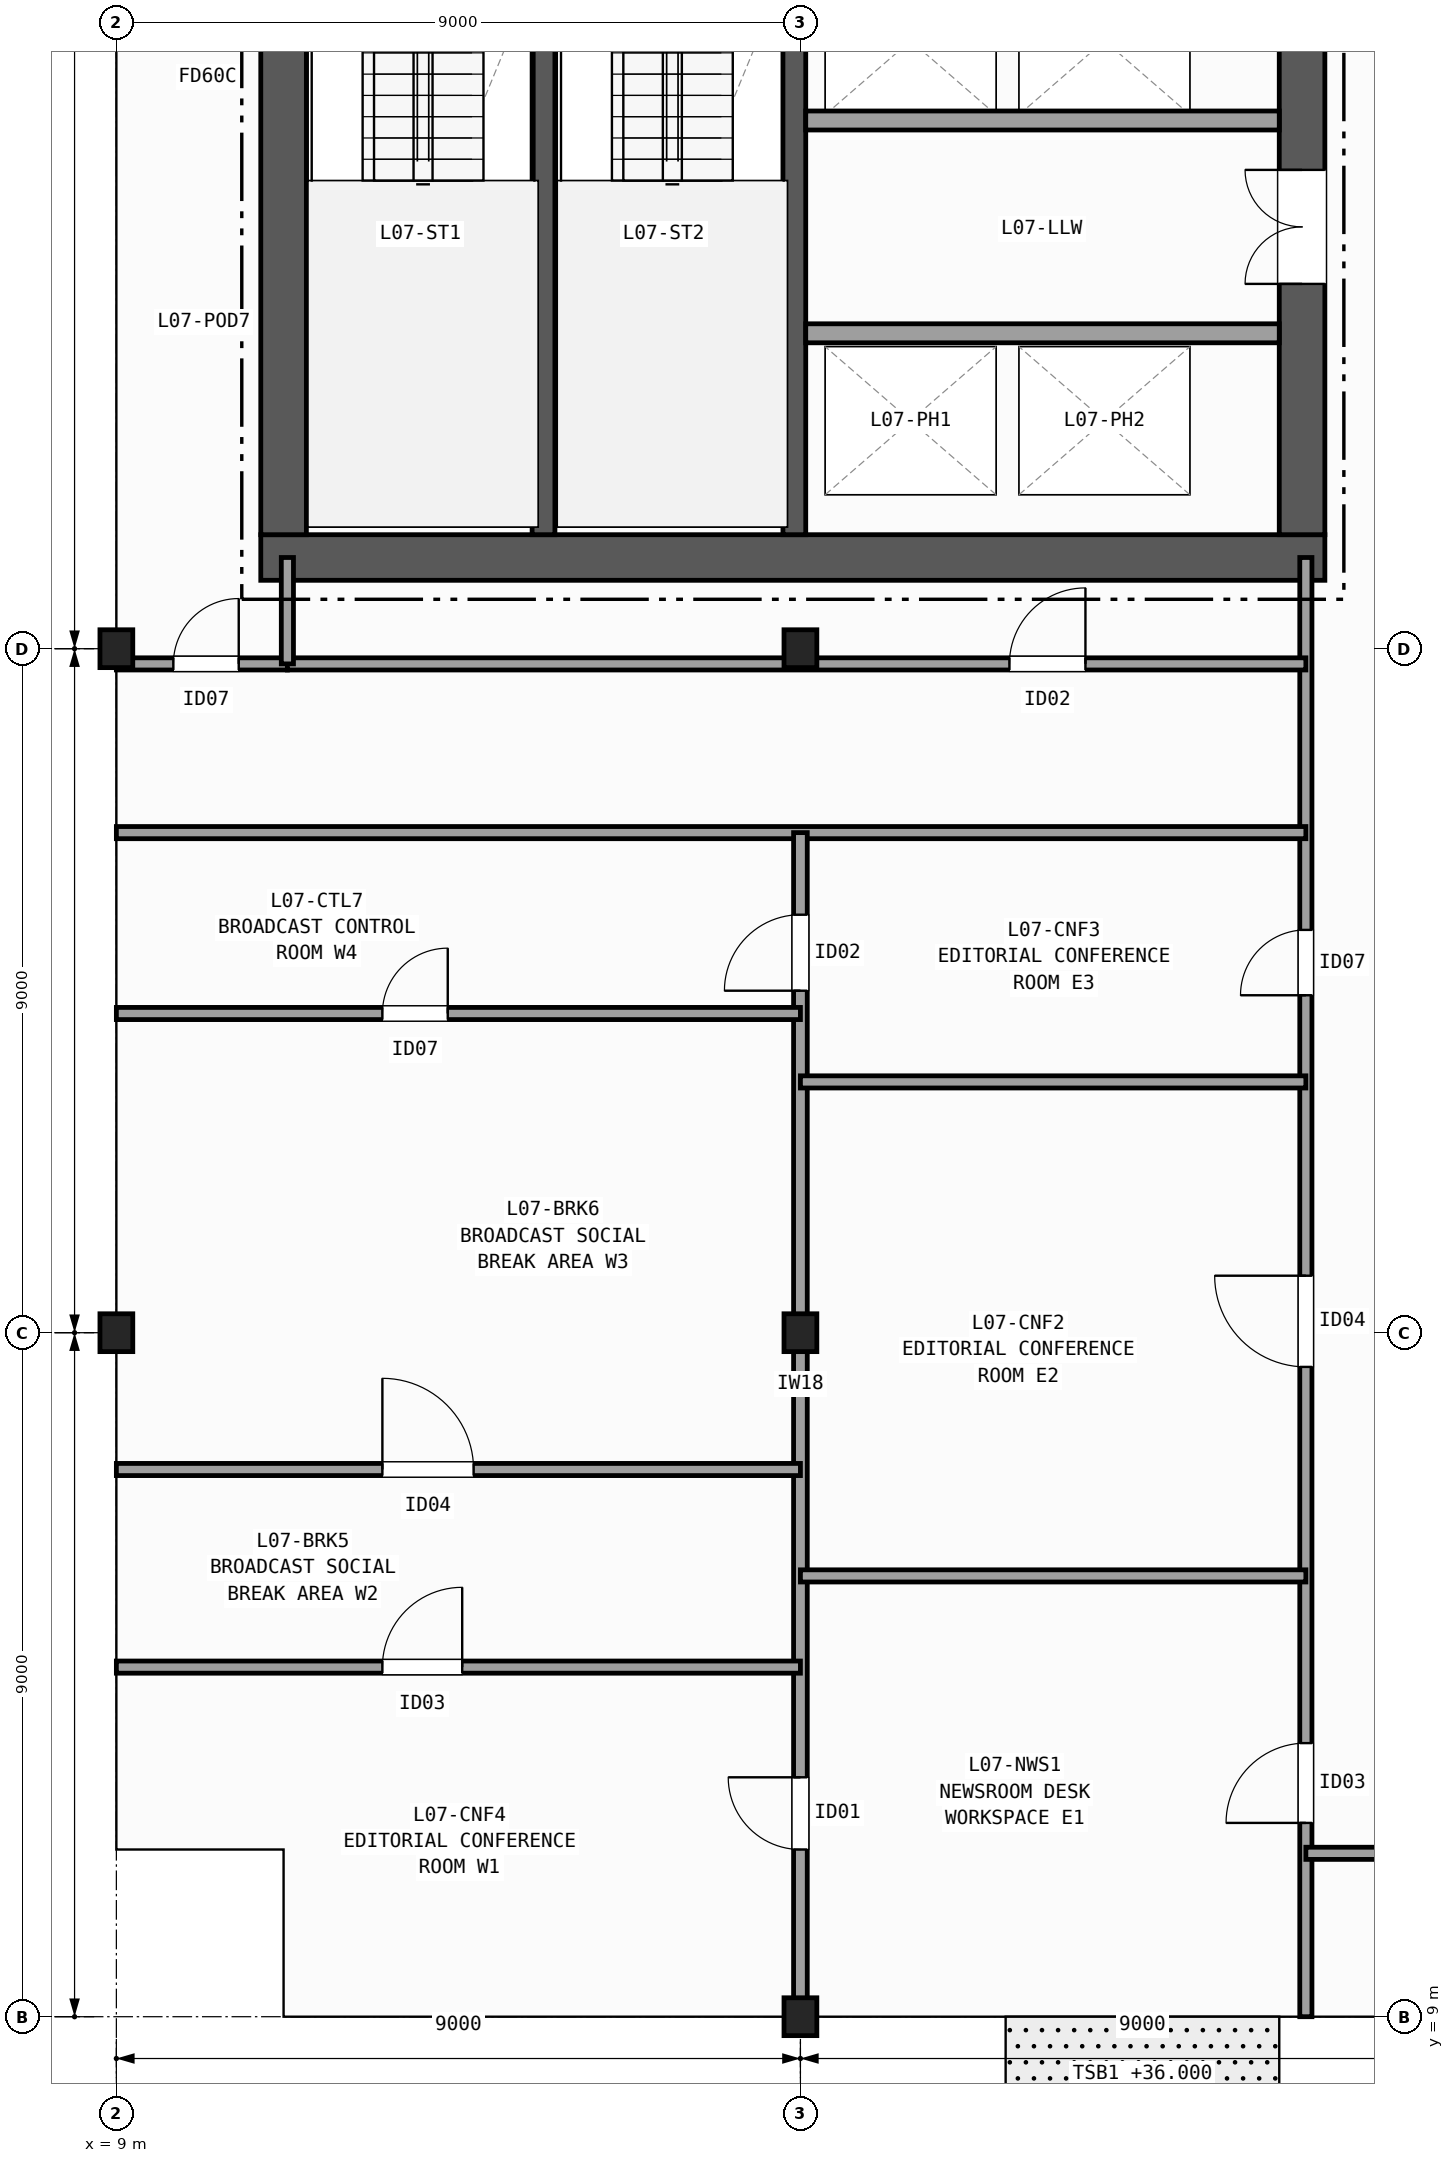
"""IFC4 building model, lengths in metres.
Left out: names, types, materials, properties, quantities, classifications, styles, units other than length and angle.
Written with IfcOpenShell. Run it as: python <this file> out.ifc"""

import sys

from ifc_helpers import new_model, si_unit, direction, frame, frame_2d, origin, origin_2d, place, context, subcontext, project, spatial, rectangle, i_section, extrude, element, fill, save


model = new_model("IFC4")
c1 = context("Model", 3, precision=1e-05, world=origin(), true_north=direction((0.0, 1.0)))
c2 = subcontext(c1, "Body", "Model", "MODEL_VIEW")
j1 = project(units=[si_unit("LENGTHUNIT", "METRE"), si_unit("PLANEANGLEUNIT", "RADIAN")], contexts=[c1])
p1 = place(None, origin())
s1 = spatial("IfcSite", under=j1, at=p1, CompositionType="ELEMENT")
p2 = place(p1, origin())
s2 = spatial("IfcBuilding", under=s1, at=p2, CompositionType="ELEMENT")
p3 = place(p2, frame((0.0, 0.0, 36.0)))
s3 = spatial("IfcBuildingStorey", under=s2, at=p3, CompositionType="ELEMENT", Elevation=36.0)
for number, where, z_axis, x_axis in (
    (1, (9.0, 18.0, 0.0), (0.0, 0.0, 1.0), (1.0, 0.0, 0.0)),
    (2, (9.0, 27.0, 0.0), (0.0, 0.0, 1.0), (1.0, 0.0, 0.0)),
    (3, (18.0, 9.0, 0.0), (0.0, 0.0, 1.0), (1.0, 0.0, 0.0)),
    (4, (18.0, 18.0, 0.0), (0.0, 0.0, 1.0), (1.0, 0.0, 0.0)),
    (5, (18.0, 27.0, 0.0), (0.0, 0.0, 1.0), (1.0, 0.0, 0.0)),
):
    element("IfcColumn", number, at=place(p3, frame(where, z_axis=z_axis, x_axis=x_axis)), inside=s3, PredefinedType="COLUMN", context=c2, shape_type="SweptSolid", body=[
        extrude(i_section(OverallWidth=0.432, OverallDepth=0.498, WebThickness=0.056, FlangeThickness=0.089, FilletRadius=0.015, at=origin_2d()), origin(), (0.0, 0.0, 1.0), 3.7),
    ])
p4 = place(p3, frame((10.9, 28.2, 0.0), z_axis=(0.0, 0.0, 1.0), x_axis=(1.0, 0.0, 0.0)))
e6 = element("IfcWall", 6, at=p4, inside=s3, PredefinedType="SHEAR", context=c2, shape_type="SweptSolid", body=[
    extrude(rectangle(XDim=14.0, YDim=0.6, at=frame_2d((7.0, 0.0))), origin(), (0.0, 0.0, 1.0), 3.42),
])
p5 = place(p3, frame((11.2, 42.1, 0.0), z_axis=(0.0, 0.0, 1.0), x_axis=(0.0, -1.0, 0.0)))
e7 = element("IfcWall", 7, at=p5, inside=s3, PredefinedType="SHEAR", context=c2, shape_type="SweptSolid", body=[
    extrude(rectangle(XDim=13.6, YDim=0.6, at=frame_2d((6.8, 0.0))), origin(), (0.0, 0.0, 1.0), 3.42),
])
p6 = place(p3, frame((24.6, 28.5, 0.0), z_axis=(0.0, 0.0, 1.0), x_axis=(0.0, 1.0, 0.0)))
e8 = element("IfcWall", 8, at=p6, inside=s3, PredefinedType="SHEAR", context=c2, shape_type="SweptSolid", body=[
    extrude(rectangle(XDim=13.6, YDim=0.6, at=frame_2d((6.8, 0.0))), origin(), (0.0, 0.0, 1.0), 3.42),
])
p7 = place(p6, frame((3.3, 0.0, 0.0)))
e9 = element("IfcOpeningElement", 9, at=p7, cuts=e8, PredefinedType="OPENING", context=c2, shape_type="SweptSolid", body=[
    extrude(rectangle(XDim=1.5, YDim=2.2, at=frame_2d((0.75, 1.1))), frame((0.0, 0.31, 0.0), z_axis=(0.0, -1.0, 0.0), x_axis=(1.0, 0.0, 0.0)), (0.0, 0.0, 1.0), 0.62),
])
p8 = place(p6, frame((9.9, 0.0, 0.0)))
e10 = element("IfcOpeningElement", 10, at=p8, cuts=e8, PredefinedType="OPENING", context=c2, shape_type="SweptSolid", body=[
    extrude(rectangle(XDim=0.9, YDim=2.1, at=frame_2d((0.45, 1.05))), frame((0.0, 0.31, 0.0), z_axis=(0.0, -1.0, 0.0), x_axis=(1.0, 0.0, 0.0)), (0.0, 0.0, 1.0), 0.62),
])
p9 = place(p3, frame((14.62, 28.5, 0.0), z_axis=(0.0, 0.0, 1.0), x_axis=(0.0, 1.0, 0.0)))
e11 = element("IfcWall", 11, at=p9, inside=s3, PredefinedType="SHEAR", context=c2, shape_type="SweptSolid", body=[
    extrude(rectangle(XDim=8.95, YDim=0.3, at=frame_2d((4.475, 0.0))), origin(), (0.0, 0.0, 1.0), 3.42),
])
p10 = place(p3, frame((17.92, 42.1, 0.0), z_axis=(0.0, 0.0, 1.0), x_axis=(0.0, -1.0, 0.0)))
e12 = element("IfcWall", 12, at=p10, inside=s3, PredefinedType="SHEAR", context=c2, shape_type="SweptSolid", body=[
    extrude(rectangle(XDim=13.6, YDim=0.3, at=frame_2d((6.8, 0.0))), origin(), (0.0, 0.0, 1.0), 3.42),
])
p11 = place(p10, frame((1.925, 0.0, 0.0)))
e13 = element("IfcOpeningElement", 13, at=p11, cuts=e12, PredefinedType="OPENING", context=c2, shape_type="SweptSolid", body=[
    extrude(rectangle(XDim=1.15, YDim=2.15, at=frame_2d((0.575, 1.075))), frame((0.0, 0.16, 0.0), z_axis=(0.0, -1.0, 0.0), x_axis=(1.0, 0.0, 0.0)), (0.0, 0.0, 1.0), 0.32),
])
for number, where, z_axis, x_axis in (
    (14, (18.07, 31.15, 0.0), (0.0, 0.0, 1.0), (1.0, 0.0, 0.0)),
    (15, (24.3, 33.95, 0.0), (0.0, 0.0, 1.0), (-1.0, 0.0, 0.0)),
):
    element("IfcWall", number, at=place(p3, frame(where, z_axis=z_axis, x_axis=x_axis)), inside=s3, PredefinedType="PARTITIONING", context=c2, shape_type="SweptSolid", body=[
        extrude(rectangle(XDim=6.23, YDim=0.25, at=frame_2d((3.115, 0.0))), origin(), (0.0, 0.0, 1.0), 3.42),
    ])
p12 = place(p3, frame((9.0, 26.8, 0.0), z_axis=(0.0, 0.0, 1.0), x_axis=(1.0, 0.0, 0.0)))
e16 = element("IfcWall", 16, at=p12, inside=s3, PredefinedType="PARTITIONING", context=c2, shape_type="SweptSolid", body=[
    extrude(rectangle(XDim=2.25, YDim=0.16, at=frame_2d((1.125, 0.0))), origin(), (0.0, 0.0, 1.0), 2.627),
])
p13 = place(p12, frame((0.75, 0.0, 0.0)))
e17 = element("IfcOpeningElement", 17, at=p13, cuts=e16, PredefinedType="OPENING", context=c2, shape_type="SweptSolid", body=[
    extrude(rectangle(XDim=0.86, YDim=2.05, at=frame_2d((0.43, 1.025))), frame((0.0, 0.09, 0.0), z_axis=(0.0, -1.0, 0.0), x_axis=(1.0, 0.0, 0.0)), (0.0, 0.0, 1.0), 0.18),
])
p14 = place(p3, frame((24.65, 9.0, 0.0), z_axis=(0.0, 0.0, 1.0), x_axis=(0.0, 1.0, 0.0)))
e18 = element("IfcWall", 18, at=p14, inside=s3, PredefinedType="PARTITIONING", context=c2, shape_type="SweptSolid", body=[
    extrude(rectangle(XDim=19.2, YDim=0.16, at=frame_2d((9.6, 0.0))), origin(), (0.0, 0.0, 1.0), 2.627),
])
p15 = place(p14, frame((2.55, 0.0, 0.0)))
e19 = element("IfcOpeningElement", 19, at=p15, cuts=e18, PredefinedType="OPENING", context=c2, shape_type="SweptSolid", body=[
    extrude(rectangle(XDim=1.05, YDim=2.15, at=frame_2d((0.525, 1.075))), frame((0.0, 0.09, 0.0), z_axis=(0.0, -1.0, 0.0), x_axis=(1.0, 0.0, 0.0)), (0.0, 0.0, 1.0), 0.18),
])
p16 = place(p14, frame((8.55, 0.0, 0.0)))
e20 = element("IfcOpeningElement", 20, at=p16, cuts=e18, PredefinedType="OPENING", context=c2, shape_type="SweptSolid", body=[
    extrude(rectangle(XDim=1.2, YDim=2.15, at=frame_2d((0.6, 1.075))), frame((0.0, 0.09, 0.0), z_axis=(0.0, -1.0, 0.0), x_axis=(1.0, 0.0, 0.0)), (0.0, 0.0, 1.0), 0.18),
])
p17 = place(p14, frame((13.44, 0.0, 0.0)))
e21 = element("IfcOpeningElement", 21, at=p17, cuts=e18, PredefinedType="OPENING", context=c2, shape_type="SweptSolid", body=[
    extrude(rectangle(XDim=0.86, YDim=2.05, at=frame_2d((0.43, 1.025))), frame((0.0, 0.09, 0.0), z_axis=(0.0, -1.0, 0.0), x_axis=(1.0, 0.0, 0.0)), (0.0, 0.0, 1.0), 0.18),
])
p18 = place(p3, frame((9.0, 24.58, 0.0), z_axis=(0.0, 0.0, 1.0), x_axis=(1.0, 0.0, 0.0)))
e22 = element("IfcWall", 22, at=p18, inside=s3, PredefinedType="PARTITIONING", context=c2, shape_type="SweptSolid", body=[
    extrude(rectangle(XDim=15.65, YDim=0.16, at=frame_2d((7.825, 0.0))), origin(), (0.0, 0.0, 1.0), 2.627),
])
p19 = place(p3, frame((11.25, 26.8, 0.0), z_axis=(0.0, 0.0, 1.0), x_axis=(1.0, 0.0, 0.0)))
e23 = element("IfcWall", 23, at=p19, inside=s3, PredefinedType="PARTITIONING", context=c2, shape_type="SweptSolid", body=[
    extrude(rectangle(XDim=13.4, YDim=0.16, at=frame_2d((6.7, 0.0))), origin(), (0.0, 0.0, 1.0), 2.789),
])
p20 = place(p19, frame((9.5, 0.0, 0.0)))
e24 = element("IfcOpeningElement", 24, at=p20, cuts=e23, PredefinedType="OPENING", context=c2, shape_type="SweptSolid", body=[
    extrude(rectangle(XDim=1.0, YDim=2.1, at=frame_2d((0.5, 1.05))), frame((0.0, 0.09, 0.0), z_axis=(0.0, -1.0, 0.0), x_axis=(1.0, 0.0, 0.0)), (0.0, 0.0, 1.0), 0.18),
])
p21 = place(p3, frame((11.25, 26.8, 0.0), z_axis=(0.0, 0.0, 1.0), x_axis=(0.0, 1.0, 0.0)))
e25 = element("IfcWall", 25, at=p21, inside=s3, PredefinedType="PARTITIONING", context=c2, shape_type="SweptSolid", body=[
    extrude(rectangle(XDim=1.4, YDim=0.16, at=frame_2d((0.7, 0.0))), origin(), (0.0, 0.0, 1.0), 2.789),
])
p22 = place(p3, frame((18.0, 9.0, 0.0), z_axis=(0.0, 0.0, 1.0), x_axis=(0.0, 1.0, 0.0)))
e26 = element("IfcWall", 26, at=p22, inside=s3, PredefinedType="PARTITIONING", context=c2, shape_type="SweptSolid", body=[
    extrude(rectangle(XDim=15.58, YDim=0.18, at=frame_2d((7.79, 0.0))), origin(), (0.0, 0.0, 1.0), 2.627),
])
p23 = place(p22, frame((2.2, 0.0, 0.0)))
e27 = element("IfcOpeningElement", 27, at=p23, cuts=e26, PredefinedType="OPENING", context=c2, shape_type="SweptSolid", body=[
    extrude(rectangle(XDim=0.95, YDim=2.1, at=frame_2d((0.475, 1.05))), frame((0.0, 0.1, 0.0), z_axis=(0.0, -1.0, 0.0), x_axis=(1.0, 0.0, 0.0)), (0.0, 0.0, 1.0), 0.2),
])
p24 = place(p22, frame((13.5, 0.0, 0.0)))
e28 = element("IfcOpeningElement", 28, at=p24, cuts=e26, PredefinedType="OPENING", context=c2, shape_type="SweptSolid", body=[
    extrude(rectangle(XDim=1.0, YDim=2.1, at=frame_2d((0.5, 1.05))), frame((0.0, 0.1, 0.0), z_axis=(0.0, -1.0, 0.0), x_axis=(1.0, 0.0, 0.0)), (0.0, 0.0, 1.0), 0.2),
])
for number, where, z_axis, x_axis in (
    (29, (18.0, 14.8, 0.0), (0.0, 0.0, 1.0), (1.0, 0.0, 0.0)),
    (30, (18.0, 21.3, 0.0), (0.0, 0.0, 1.0), (1.0, 0.0, 0.0)),
):
    element("IfcWall", number, at=place(p3, frame(where, z_axis=z_axis, x_axis=x_axis)), inside=s3, PredefinedType="PARTITIONING", context=c2, shape_type="SweptSolid", body=[
        extrude(rectangle(XDim=6.65, YDim=0.16, at=frame_2d((3.325, 0.0))), origin(), (0.0, 0.0, 1.0), 2.792),
    ])
p25 = place(p3, frame((9.0, 13.6, 0.0), z_axis=(0.0, 0.0, 1.0), x_axis=(1.0, 0.0, 0.0)))
e31 = element("IfcWall", 31, at=p25, inside=s3, PredefinedType="PARTITIONING", context=c2, shape_type="SweptSolid", body=[
    extrude(rectangle(XDim=9.0, YDim=0.16, at=frame_2d((4.5, 0.0))), origin(), (0.0, 0.0, 1.0), 2.792),
])
p26 = place(p25, frame((3.5, 0.0, 0.0)))
e32 = element("IfcOpeningElement", 32, at=p26, cuts=e31, PredefinedType="OPENING", context=c2, shape_type="SweptSolid", body=[
    extrude(rectangle(XDim=1.05, YDim=2.15, at=frame_2d((0.525, 1.075))), frame((0.0, 0.09, 0.0), z_axis=(0.0, -1.0, 0.0), x_axis=(1.0, 0.0, 0.0)), (0.0, 0.0, 1.0), 0.18),
])
p27 = place(p3, frame((9.0, 16.2, 0.0), z_axis=(0.0, 0.0, 1.0), x_axis=(1.0, 0.0, 0.0)))
e33 = element("IfcWall", 33, at=p27, inside=s3, PredefinedType="PARTITIONING", context=c2, shape_type="SweptSolid", body=[
    extrude(rectangle(XDim=9.0, YDim=0.16, at=frame_2d((4.5, 0.0))), origin(), (0.0, 0.0, 1.0), 2.792),
])
p28 = place(p27, frame((3.5, 0.0, 0.0)))
e34 = element("IfcOpeningElement", 34, at=p28, cuts=e33, PredefinedType="OPENING", context=c2, shape_type="SweptSolid", body=[
    extrude(rectangle(XDim=1.2, YDim=2.15, at=frame_2d((0.6, 1.075))), frame((0.0, 0.09, 0.0), z_axis=(0.0, -1.0, 0.0), x_axis=(1.0, 0.0, 0.0)), (0.0, 0.0, 1.0), 0.18),
])
p29 = place(p3, frame((9.0, 22.2, 0.0), z_axis=(0.0, 0.0, 1.0), x_axis=(1.0, 0.0, 0.0)))
e35 = element("IfcWall", 35, at=p29, inside=s3, PredefinedType="PARTITIONING", context=c2, shape_type="SweptSolid", body=[
    extrude(rectangle(XDim=9.0, YDim=0.16, at=frame_2d((4.5, 0.0))), origin(), (0.0, 0.0, 1.0), 2.627),
])
p30 = place(p29, frame((3.5, 0.0, 0.0)))
e36 = element("IfcOpeningElement", 36, at=p30, cuts=e35, PredefinedType="OPENING", context=c2, shape_type="SweptSolid", body=[
    extrude(rectangle(XDim=0.86, YDim=2.05, at=frame_2d((0.43, 1.025))), frame((0.0, 0.09, 0.0), z_axis=(0.0, -1.0, 0.0), x_axis=(1.0, 0.0, 0.0)), (0.0, 0.0, 1.0), 0.18),
])
p31 = place(p3, frame((24.65, 11.15, 0.0), z_axis=(0.0, 0.0, 1.0), x_axis=(1.0, 0.0, 0.0)))
e37 = element("IfcWall", 37, at=p31, inside=s3, PredefinedType="PARTITIONING", context=c2, shape_type="SweptSolid", body=[
    extrude(rectangle(XDim=4.75, YDim=0.16, at=frame_2d((2.375, 0.0))), origin(), (0.0, 0.0, 1.0), 2.792),
])
p32 = place(p31, frame((1.2, 0.0, 0.0)))
e38 = element("IfcOpeningElement", 38, at=p32, cuts=e37, PredefinedType="OPENING", context=c2, shape_type="SweptSolid", body=[
    extrude(rectangle(XDim=1.2, YDim=2.15, at=frame_2d((0.6, 1.075))), frame((0.0, 0.09, 0.0), z_axis=(0.0, -1.0, 0.0), x_axis=(1.0, 0.0, 0.0)), (0.0, 0.0, 1.0), 0.18),
])
p33 = place(p7, origin())
e39 = element("IfcDoor", 39, at=p33, inside=s3, OperationType="DOUBLE_DOOR_SINGLE_SWING", PredefinedType="DOOR", context=c2, shape_type="SweptSolid", body=[
    extrude(rectangle(XDim=1.5, YDim=2.2, at=frame_2d((0.75, 1.1))), frame((0.0, 0.025, 0.0), z_axis=(0.0, -1.0, 0.0), x_axis=(1.0, 0.0, 0.0)), (0.0, 0.0, 1.0), 0.05),
])
fill(e9, e39)
p34 = place(p13, origin())
e40 = element("IfcDoor", 40, at=p34, inside=s3, OperationType="SINGLE_SWING_RIGHT", PredefinedType="DOOR", context=c2, shape_type="SweptSolid", body=[
    extrude(rectangle(XDim=0.86, YDim=2.05, at=frame_2d((0.43, 1.025))), frame((0.0, 0.025, 0.0), z_axis=(0.0, -1.0, 0.0), x_axis=(1.0, 0.0, 0.0)), (0.0, 0.0, 1.0), 0.05),
])
fill(e17, e40)
p35 = place(p20, origin())
e41 = element("IfcDoor", 41, at=p35, inside=s3, OperationType="SINGLE_SWING_RIGHT", PredefinedType="DOOR", context=c2, shape_type="SweptSolid", body=[
    extrude(rectangle(XDim=1.0, YDim=2.1, at=frame_2d((0.5, 1.05))), frame((0.0, 0.025, 0.0), z_axis=(0.0, -1.0, 0.0), x_axis=(1.0, 0.0, 0.0)), (0.0, 0.0, 1.0), 0.05),
])
fill(e24, e41)
p36 = place(p15, origin())
e42 = element("IfcDoor", 42, at=p36, inside=s3, OperationType="SINGLE_SWING_LEFT", PredefinedType="DOOR", context=c2, shape_type="SweptSolid", body=[
    extrude(rectangle(XDim=1.05, YDim=2.15, at=frame_2d((0.525, 1.075))), frame((0.0, 0.025, 0.0), z_axis=(0.0, -1.0, 0.0), x_axis=(1.0, 0.0, 0.0)), (0.0, 0.0, 1.0), 0.05),
])
fill(e19, e42)
p37 = place(p16, origin())
e43 = element("IfcDoor", 43, at=p37, inside=s3, OperationType="SINGLE_SWING_RIGHT", PredefinedType="DOOR", context=c2, shape_type="SweptSolid", body=[
    extrude(rectangle(XDim=1.2, YDim=2.15, at=frame_2d((0.6, 1.075))), frame((0.0, 0.025, 0.0), z_axis=(0.0, -1.0, 0.0), x_axis=(1.0, 0.0, 0.0)), (0.0, 0.0, 1.0), 0.05),
])
fill(e20, e43)
p38 = place(p17, origin())
e44 = element("IfcDoor", 44, at=p38, inside=s3, OperationType="SINGLE_SWING_LEFT", PredefinedType="DOOR", context=c2, shape_type="SweptSolid", body=[
    extrude(rectangle(XDim=0.86, YDim=2.05, at=frame_2d((0.43, 1.025))), frame((0.0, 0.025, 0.0), z_axis=(0.0, -1.0, 0.0), x_axis=(1.0, 0.0, 0.0)), (0.0, 0.0, 1.0), 0.05),
])
fill(e21, e44)
p39 = place(p23, origin())
e45 = element("IfcDoor", 45, at=p39, inside=s3, OperationType="SINGLE_SWING_RIGHT", PredefinedType="DOOR", context=c2, shape_type="SweptSolid", body=[
    extrude(rectangle(XDim=0.95, YDim=2.1, at=frame_2d((0.475, 1.05))), frame((0.0, 0.025, 0.0), z_axis=(0.0, -1.0, 0.0), x_axis=(1.0, 0.0, 0.0)), (0.0, 0.0, 1.0), 0.05),
])
fill(e27, e45)
p40 = place(p24, origin())
e46 = element("IfcDoor", 46, at=p40, inside=s3, OperationType="SINGLE_SWING_LEFT", PredefinedType="DOOR", context=c2, shape_type="SweptSolid", body=[
    extrude(rectangle(XDim=1.0, YDim=2.1, at=frame_2d((0.5, 1.05))), frame((0.0, 0.025, 0.0), z_axis=(0.0, -1.0, 0.0), x_axis=(1.0, 0.0, 0.0)), (0.0, 0.0, 1.0), 0.05),
])
fill(e28, e46)
p41 = place(p26, origin())
e47 = element("IfcDoor", 47, at=p41, inside=s3, OperationType="SINGLE_SWING_RIGHT", PredefinedType="DOOR", context=c2, shape_type="SweptSolid", body=[
    extrude(rectangle(XDim=1.05, YDim=2.15, at=frame_2d((0.525, 1.075))), frame((0.0, 0.025, 0.0), z_axis=(0.0, -1.0, 0.0), x_axis=(1.0, 0.0, 0.0)), (0.0, 0.0, 1.0), 0.05),
])
fill(e32, e47)
p42 = place(p28, origin())
e48 = element("IfcDoor", 48, at=p42, inside=s3, OperationType="SINGLE_SWING_LEFT", PredefinedType="DOOR", context=c2, shape_type="SweptSolid", body=[
    extrude(rectangle(XDim=1.2, YDim=2.15, at=frame_2d((0.6, 1.075))), frame((0.0, 0.025, 0.0), z_axis=(0.0, -1.0, 0.0), x_axis=(1.0, 0.0, 0.0)), (0.0, 0.0, 1.0), 0.05),
])
fill(e34, e48)
p43 = place(p30, origin())
e49 = element("IfcDoor", 49, at=p43, inside=s3, OperationType="SINGLE_SWING_RIGHT", PredefinedType="DOOR", context=c2, shape_type="SweptSolid", body=[
    extrude(rectangle(XDim=0.86, YDim=2.05, at=frame_2d((0.43, 1.025))), frame((0.0, 0.025, 0.0), z_axis=(0.0, -1.0, 0.0), x_axis=(1.0, 0.0, 0.0)), (0.0, 0.0, 1.0), 0.05),
])
fill(e36, e49)
save(model, sys.argv[1])
